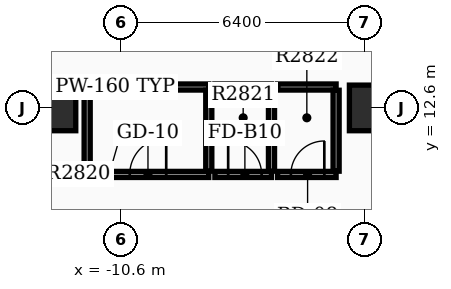
"""IFC4 building model, lengths in metres.
Left out: names, types, materials, properties, quantities, classifications, styles, units other than length and angle.
Written with IfcOpenShell. Run it as: python <this file> out.ifc"""

import sys

from ifc_helpers import new_model, si_unit, direction, frame, frame_2d, origin, origin_2d, place, context, subcontext, project, spatial, rectangle, extrude, element, fill, save


model = new_model("IFC4")
c1 = context("Model", 3, precision=1e-05, world=origin(), true_north=direction((0.0, 1.0)))
c2 = subcontext(c1, "Body", "Model", "MODEL_VIEW")
j1 = project(units=[si_unit("LENGTHUNIT", "METRE"), si_unit("PLANEANGLEUNIT", "RADIAN")], contexts=[c1])
p1 = place(None, origin())
s1 = spatial("IfcSite", under=j1, at=p1, CompositionType="ELEMENT")
p2 = place(p1, origin())
s2 = spatial("IfcBuilding", under=s1, at=p2, CompositionType="ELEMENT")
p3 = place(p2, frame((0.0, 0.0, 176.1)))
s3 = spatial("IfcBuildingStorey", under=s2, at=p3, CompositionType="ELEMENT", Elevation=176.1)
for number, where, z_axis, x_axis in (
    (1, (-12.4, 12.6, 0.0), (0.0, 0.0, 1.0), (1.0, 0.0, 0.0)),
    (2, (-4.0, 12.6, 0.0), (0.0, 0.0, 1.0), (1.0, 0.0, 0.0)),
):
    element("IfcColumn", number, at=place(p3, frame(where, z_axis=z_axis, x_axis=x_axis)), inside=s3, PredefinedType="COLUMN", context=c2, shape_type="SweptSolid", body=[
        extrude(rectangle(XDim=1.2, YDim=1.2, at=origin_2d()), origin(), (0.0, 0.0, 1.0), 3.9),
    ])
p4 = place(p3, frame((-11.5, 10.85, 0.0), z_axis=(0.0, 0.0, 1.0), x_axis=(1.0, 0.0, 0.0)))
e3 = element("IfcWall", 3, at=p4, inside=s3, PredefinedType="PARTITIONING", context=c2, shape_type="SweptSolid", body=[
    extrude(rectangle(XDim=3.2, YDim=0.16, at=frame_2d((1.6, 0.0))), origin(), (0.0, 0.0, 1.0), 2.96),
])
p5 = place(p4, frame((1.12, 0.0, 0.0)))
e4 = element("IfcOpeningElement", 4, at=p5, cuts=e3, PredefinedType="OPENING", context=c2, shape_type="SweptSolid", body=[
    extrude(rectangle(XDim=0.96, YDim=2.15, at=frame_2d((0.48, 1.075))), frame((0.0, 0.09, 0.0), z_axis=(0.0, -1.0, 0.0), x_axis=(1.0, 0.0, 0.0)), (0.0, 0.0, 1.0), 0.18),
])
p6 = place(p3, frame((-11.5, 13.15, 0.0), z_axis=(0.0, 0.0, 1.0), x_axis=(1.0, 0.0, 0.0)))
e5 = element("IfcWall", 5, at=p6, inside=s3, PredefinedType="PARTITIONING", context=c2, shape_type="SweptSolid", body=[
    extrude(rectangle(XDim=3.2, YDim=0.16, at=frame_2d((1.6, 0.0))), origin(), (0.0, 0.0, 1.0), 2.96),
])
for number, where, z_axis, x_axis in (
    (6, (-11.5, 10.935, 0.0), (0.0, 0.0, 1.0), (0.0, 1.0, 0.0)),
    (7, (-8.3, 10.935, 0.0), (0.0, 0.0, 1.0), (0.0, 1.0, 0.0)),
):
    element("IfcWall", number, at=place(p3, frame(where, z_axis=z_axis, x_axis=x_axis)), inside=s3, PredefinedType="PARTITIONING", context=c2, shape_type="SweptSolid", body=[
        extrude(rectangle(XDim=2.13, YDim=0.16, at=frame_2d((1.065, 0.0))), origin(), (0.0, 0.0, 1.0), 2.96),
    ])
p7 = place(p3, frame((-8.14, 10.85, 0.0), z_axis=(0.0, 0.0, 1.0), x_axis=(1.0, 0.0, 0.0)))
e8 = element("IfcWall", 8, at=p7, inside=s3, PredefinedType="PARTITIONING", context=c2, shape_type="SweptSolid", body=[
    extrude(rectangle(XDim=1.49, YDim=0.16, at=frame_2d((0.745, 0.0))), origin(), (0.0, 0.0, 1.0), 2.96),
])
p8 = place(p7, frame((0.35, 0.0, 0.0)))
e9 = element("IfcOpeningElement", 9, at=p8, cuts=e8, PredefinedType="OPENING", context=c2, shape_type="SweptSolid", body=[
    extrude(rectangle(XDim=0.88, YDim=2.1, at=frame_2d((0.44, 1.05))), frame((0.0, 0.09, 0.0), z_axis=(0.0, -1.0, 0.0), x_axis=(1.0, 0.0, 0.0)), (0.0, 0.0, 1.0), 0.18),
])
p9 = place(p3, frame((-8.14, 13.15, 0.0), z_axis=(0.0, 0.0, 1.0), x_axis=(1.0, 0.0, 0.0)))
e10 = element("IfcWall", 10, at=p9, inside=s3, PredefinedType="PARTITIONING", context=c2, shape_type="SweptSolid", body=[
    extrude(rectangle(XDim=1.49, YDim=0.16, at=frame_2d((0.745, 0.0))), origin(), (0.0, 0.0, 1.0), 2.96),
])
p10 = place(p3, frame((-6.65, 10.935, 0.0), z_axis=(0.0, 0.0, 1.0), x_axis=(0.0, 1.0, 0.0)))
e11 = element("IfcWall", 11, at=p10, inside=s3, PredefinedType="PARTITIONING", context=c2, shape_type="SweptSolid", body=[
    extrude(rectangle(XDim=2.13, YDim=0.16, at=frame_2d((1.065, 0.0))), origin(), (0.0, 0.0, 1.0), 2.96),
])
p11 = place(p3, frame((-6.49, 10.85, 0.0), z_axis=(0.0, 0.0, 1.0), x_axis=(1.0, 0.0, 0.0)))
e12 = element("IfcWall", 12, at=p11, inside=s3, PredefinedType="PARTITIONING", context=c2, shape_type="SweptSolid", body=[
    extrude(rectangle(XDim=1.54, YDim=0.16, at=frame_2d((0.77, 0.0))), origin(), (0.0, 0.0, 1.0), 2.96),
])
p12 = place(p11, frame((0.35, 0.0, 0.0)))
e13 = element("IfcOpeningElement", 13, at=p12, cuts=e12, PredefinedType="OPENING", context=c2, shape_type="SweptSolid", body=[
    extrude(rectangle(XDim=0.88, YDim=2.15, at=frame_2d((0.44, 1.075))), frame((0.0, 0.09, 0.0), z_axis=(0.0, -1.0, 0.0), x_axis=(1.0, 0.0, 0.0)), (0.0, 0.0, 1.0), 0.18),
])
p13 = place(p3, frame((-6.49, 13.15, 0.0), z_axis=(0.0, 0.0, 1.0), x_axis=(1.0, 0.0, 0.0)))
e14 = element("IfcWall", 14, at=p13, inside=s3, PredefinedType="PARTITIONING", context=c2, shape_type="SweptSolid", body=[
    extrude(rectangle(XDim=1.54, YDim=0.16, at=frame_2d((0.77, 0.0))), origin(), (0.0, 0.0, 1.0), 2.96),
])
p14 = place(p3, frame((-4.95, 10.935, 0.0), z_axis=(0.0, 0.0, 1.0), x_axis=(0.0, 1.0, 0.0)))
e15 = element("IfcWall", 15, at=p14, inside=s3, PredefinedType="PARTITIONING", context=c2, shape_type="SweptSolid", body=[
    extrude(rectangle(XDim=2.13, YDim=0.16, at=frame_2d((1.065, 0.0))), origin(), (0.0, 0.0, 1.0), 2.96),
])
p15 = place(p5, origin())
e16 = element("IfcDoor", 16, at=p15, inside=s3, OperationType="SINGLE_SWING_RIGHT", PredefinedType="DOOR", context=c2, shape_type="SweptSolid", body=[
    extrude(rectangle(XDim=0.96, YDim=2.15, at=frame_2d((0.48, 1.075))), frame((0.0, 0.025, 0.0), z_axis=(0.0, -1.0, 0.0), x_axis=(1.0, 0.0, 0.0)), (0.0, 0.0, 1.0), 0.05),
])
fill(e4, e16)
p16 = place(p8, origin())
e17 = element("IfcDoor", 17, at=p16, inside=s3, OperationType="SINGLE_SWING_LEFT", PredefinedType="DOOR", context=c2, shape_type="SweptSolid", body=[
    extrude(rectangle(XDim=0.88, YDim=2.1, at=frame_2d((0.44, 1.05))), frame((0.0, 0.025, 0.0), z_axis=(0.0, -1.0, 0.0), x_axis=(1.0, 0.0, 0.0)), (0.0, 0.0, 1.0), 0.05),
])
fill(e9, e17)
p17 = place(p12, origin())
e18 = element("IfcDoor", 18, at=p17, inside=s3, OperationType="SINGLE_SWING_RIGHT", PredefinedType="DOOR", context=c2, shape_type="SweptSolid", body=[
    extrude(rectangle(XDim=0.88, YDim=2.15, at=frame_2d((0.44, 1.075))), frame((0.0, 0.025, 0.0), z_axis=(0.0, -1.0, 0.0), x_axis=(1.0, 0.0, 0.0)), (0.0, 0.0, 1.0), 0.05),
])
fill(e13, e18)
save(model, sys.argv[1])
